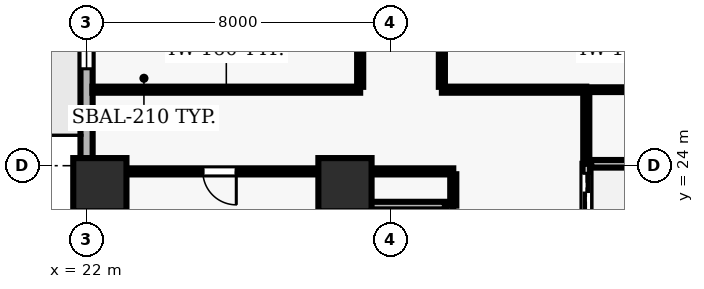
"""IFC4 building model, lengths in metres.
Left out: names, types, materials, properties, quantities, classifications, styles, units other than length and angle.
Written with IfcOpenShell. Run it as: python <this file> out.ifc"""

import sys

from ifc_helpers import new_model, si_unit, direction, frame, frame_2d, origin, origin_2d, place, context, subcontext, project, spatial, rectangle, extrude, element, fill, save


model = new_model("IFC4")
c1 = context("Model", 3, precision=1e-05, world=origin(), true_north=direction((0.0, 1.0)))
c2 = subcontext(c1, "Body", "Model", "MODEL_VIEW")
j1 = project(units=[si_unit("LENGTHUNIT", "METRE"), si_unit("PLANEANGLEUNIT", "RADIAN")], contexts=[c1])
p1 = place(None, origin())
s1 = spatial("IfcSite", under=j1, at=p1, CompositionType="ELEMENT")
p2 = place(p1, origin())
s2 = spatial("IfcBuilding", under=s1, at=p2, CompositionType="ELEMENT")
p3 = place(p2, frame((0.0, 0.0, 77.8)))
s3 = spatial("IfcBuildingStorey", under=s2, at=p3, CompositionType="ELEMENT", Elevation=77.8)
for number, where, z_axis, x_axis in (
    (1, (22.35, 23.5, 0.0), (0.0, 0.0, 1.0), (1.0, 0.0, 0.0)),
    (2, (28.8, 23.5, 0.0), (0.0, 0.0, 1.0), (1.0, 0.0, 0.0)),
):
    element("IfcColumn", number, at=place(p3, frame(where, z_axis=z_axis, x_axis=x_axis)), inside=s3, PredefinedType="COLUMN", context=c2, shape_type="SweptSolid", body=[
        extrude(rectangle(XDim=1.4, YDim=1.4, at=origin_2d()), origin(), (0.0, 0.0, 1.0), 3.9),
    ])
p4 = place(p3, frame((22.0, 51.5, 0.0), z_axis=(0.0, 0.0, 1.0), x_axis=(0.0, -1.0, 0.0)))
e3 = element("IfcWall", 3, at=p4, inside=s3, PredefinedType="SOLIDWALL", context=c2, shape_type="SweptSolid", body=[
    extrude(rectangle(XDim=49.0, YDim=0.32, at=frame_2d((24.5, 0.0))), origin(), (0.0, 0.0, 1.0), 3.69),
])
p5 = place(p4, frame((12.1, 0.0, 0.0)))
e4 = element("IfcOpeningElement", 4, at=p5, cuts=e3, PredefinedType="OPENING", context=c2, shape_type="SweptSolid", body=[
    extrude(rectangle(XDim=1.0, YDim=2.2, at=frame_2d((0.5, 1.1))), frame((0.0, 0.17, 0.0), z_axis=(0.0, -1.0, 0.0), x_axis=(1.0, 0.0, 0.0)), (0.0, 0.0, 1.0), 0.34),
])
p6 = place(p4, frame((1.822, 0.0, 0.9)))
e5 = element("IfcOpeningElement", 5, at=p6, cuts=e3, PredefinedType="OPENING", context=c2, shape_type="SweptSolid", body=[
    extrude(rectangle(XDim=1.8, YDim=1.8, at=frame_2d((0.9, 0.9))), frame((0.0, 0.17, 0.0), z_axis=(0.0, -1.0, 0.0), x_axis=(1.0, 0.0, 0.0)), (0.0, 0.0, 1.0), 0.34),
])
p7 = place(p4, frame((7.267, 0.0, 0.9)))
e6 = element("IfcOpeningElement", 6, at=p7, cuts=e3, PredefinedType="OPENING", context=c2, shape_type="SweptSolid", body=[
    extrude(rectangle(XDim=1.8, YDim=1.8, at=frame_2d((0.9, 0.9))), frame((0.0, 0.17, 0.0), z_axis=(0.0, -1.0, 0.0), x_axis=(1.0, 0.0, 0.0)), (0.0, 0.0, 1.0), 0.34),
])
p8 = place(p4, frame((19.056, 0.0, 0.9)))
e7 = element("IfcOpeningElement", 7, at=p8, cuts=e3, PredefinedType="OPENING", context=c2, shape_type="SweptSolid", body=[
    extrude(rectangle(XDim=1.8, YDim=1.8, at=frame_2d((0.9, 0.9))), frame((0.0, 0.17, 0.0), z_axis=(0.0, -1.0, 0.0), x_axis=(1.0, 0.0, 0.0)), (0.0, 0.0, 1.0), 0.34),
])
p9 = place(p4, frame((23.15, 0.0, 0.9)))
e8 = element("IfcOpeningElement", 8, at=p9, cuts=e3, PredefinedType="OPENING", context=c2, shape_type="SweptSolid", body=[
    extrude(rectangle(XDim=1.8, YDim=1.8, at=frame_2d((0.9, 0.9))), frame((0.0, 0.17, 0.0), z_axis=(0.0, -1.0, 0.0), x_axis=(1.0, 0.0, 0.0)), (0.0, 0.0, 1.0), 0.34),
])
p10 = place(p4, frame((29.044, 0.0, 0.9)))
e9 = element("IfcOpeningElement", 9, at=p10, cuts=e3, PredefinedType="OPENING", context=c2, shape_type="SweptSolid", body=[
    extrude(rectangle(XDim=1.8, YDim=1.8, at=frame_2d((0.9, 0.9))), frame((0.0, 0.17, 0.0), z_axis=(0.0, -1.0, 0.0), x_axis=(1.0, 0.0, 0.0)), (0.0, 0.0, 1.0), 0.34),
])
p11 = place(p4, frame((34.039, 0.0, 0.9)))
e10 = element("IfcOpeningElement", 10, at=p11, cuts=e3, PredefinedType="OPENING", context=c2, shape_type="SweptSolid", body=[
    extrude(rectangle(XDim=1.8, YDim=1.8, at=frame_2d((0.9, 0.9))), frame((0.0, 0.17, 0.0), z_axis=(0.0, -1.0, 0.0), x_axis=(1.0, 0.0, 0.0)), (0.0, 0.0, 1.0), 0.34),
])
p12 = place(p4, frame((39.933, 0.0, 0.9)))
e11 = element("IfcOpeningElement", 11, at=p12, cuts=e3, PredefinedType="OPENING", context=c2, shape_type="SweptSolid", body=[
    extrude(rectangle(XDim=1.8, YDim=1.8, at=frame_2d((0.9, 0.9))), frame((0.0, 0.17, 0.0), z_axis=(0.0, -1.0, 0.0), x_axis=(1.0, 0.0, 0.0)), (0.0, 0.0, 1.0), 0.34),
])
p13 = place(p3, frame((35.15, 24.05, 0.0), z_axis=(0.0, 0.0, 1.0), x_axis=(0.0, -1.0, 0.0)))
e12 = element("IfcWall", 12, at=p13, inside=s3, PredefinedType="SOLIDWALL", context=c2, shape_type="SweptSolid", body=[
    extrude(rectangle(XDim=1.5, YDim=0.2, at=frame_2d((0.75, 0.0))), origin(), (0.0, 0.0, 1.0), 3.69),
])
p14 = place(p13, frame((0.25, 0.0, 0.0)))
e13 = element("IfcOpeningElement", 13, at=p14, cuts=e12, PredefinedType="OPENING", context=c2, shape_type="SweptSolid", body=[
    extrude(rectangle(XDim=1.0, YDim=2.1, at=frame_2d((0.5, 1.05))), frame((0.0, 0.11, 0.0), z_axis=(0.0, -1.0, 0.0), x_axis=(1.0, 0.0, 0.0)), (0.0, 0.0, 1.0), 0.22),
])
p15 = place(p3, frame((37.42, 24.05, 0.0), z_axis=(0.0, 0.0, 1.0), x_axis=(-1.0, 0.0, 0.0)))
e14 = element("IfcWall", 14, at=p15, inside=s3, PredefinedType="SOLIDWALL", context=c2, shape_type="SweptSolid", body=[
    extrude(rectangle(XDim=2.14, YDim=0.2, at=frame_2d((1.07, 0.0))), origin(), (0.0, 0.0, 1.0), 3.69),
])
p16 = place(p3, frame((28.85, 22.95, 0.0), z_axis=(0.0, 0.0, 1.0), x_axis=(0.0, -1.0, 0.0)))
e15 = element("IfcWall", 15, at=p16, inside=s3, PredefinedType="SOLIDWALL", context=c2, shape_type="SweptSolid", body=[
    extrude(rectangle(XDim=1.9, YDim=0.2, at=frame_2d((0.95, 0.0))), origin(), (0.0, 0.0, 1.0), 3.69),
])
p17 = place(p3, frame((31.55, 21.05, 0.0), z_axis=(0.0, 0.0, 1.0), x_axis=(0.0, 1.0, 0.0)))
e16 = element("IfcWall", 16, at=p17, inside=s3, PredefinedType="SOLIDWALL", context=c2, shape_type="SweptSolid", body=[
    extrude(rectangle(XDim=1.9, YDim=0.2, at=frame_2d((0.95, 0.0))), origin(), (0.0, 0.0, 1.0), 3.69),
])
p18 = place(p17, frame((0.45, 0.0, 0.0)))
e17 = element("IfcOpeningElement", 17, at=p18, cuts=e16, PredefinedType="OPENING", context=c2, shape_type="SweptSolid", body=[
    extrude(rectangle(XDim=1.0, YDim=2.1, at=frame_2d((0.5, 1.05))), frame((0.0, 0.11, 0.0), z_axis=(0.0, -1.0, 0.0), x_axis=(1.0, 0.0, 0.0)), (0.0, 0.0, 1.0), 0.22),
])
p19 = place(p3, frame((31.43, 22.95, 0.0), z_axis=(0.0, 0.0, 1.0), x_axis=(-1.0, 0.0, 0.0)))
e18 = element("IfcWall", 18, at=p19, inside=s3, PredefinedType="SOLIDWALL", context=c2, shape_type="SweptSolid", body=[
    extrude(rectangle(XDim=2.46, YDim=0.2, at=frame_2d((1.23, 0.0))), origin(), (0.0, 0.0, 1.0), 3.69),
])
p20 = place(p3, frame((28.8, 23.85, 0.0), z_axis=(0.0, 0.0, 1.0), x_axis=(-1.0, 0.0, 0.0)))
e19 = element("IfcWall", 19, at=p20, inside=s3, PredefinedType="PARTITIONING", context=c2, shape_type="SweptSolid", body=[
    extrude(rectangle(XDim=6.6, YDim=0.16, at=frame_2d((3.3, 0.0))), origin(), (0.0, 0.0, 1.0), 2.995),
])
p21 = place(p20, frame((2.86, 0.0, 0.0)))
e20 = element("IfcOpeningElement", 20, at=p21, cuts=e19, PredefinedType="OPENING", context=c2, shape_type="SweptSolid", body=[
    extrude(rectangle(XDim=0.88, YDim=2.1, at=frame_2d((0.44, 1.05))), frame((0.0, 0.09, 0.0), z_axis=(0.0, -1.0, 0.0), x_axis=(1.0, 0.0, 0.0)), (0.0, 0.0, 1.0), 0.18),
])
p22 = place(p3, frame((28.8, 23.85, 0.0), z_axis=(0.0, 0.0, 1.0), x_axis=(1.0, 0.0, 0.0)))
e21 = element("IfcWall", 21, at=p22, inside=s3, PredefinedType="PARTITIONING", context=c2, shape_type="SweptSolid", body=[
    extrude(rectangle(XDim=2.85, YDim=0.16, at=frame_2d((1.425, 0.0))), origin(), (0.0, 0.0, 1.0), 3.69),
])
p23 = place(p3, frame((29.2, 26.0, 0.0), z_axis=(0.0, 0.0, 1.0), x_axis=(-1.0, 0.0, 0.0)))
e22 = element("IfcWall", 22, at=p23, inside=s3, PredefinedType="PARTITIONING", context=c2, shape_type="SweptSolid", body=[
    extrude(rectangle(XDim=7.045, YDim=0.16, at=frame_2d((3.522, 0.0))), origin(), (0.0, 0.0, 1.0), 3.69),
])
p24 = place(p3, frame((35.15, 26.0, 0.0), z_axis=(0.0, 0.0, 1.0), x_axis=(-1.0, 0.0, 0.0)))
e23 = element("IfcWall", 23, at=p24, inside=s3, PredefinedType="PARTITIONING", context=c2, shape_type="SweptSolid", body=[
    extrude(rectangle(XDim=3.8, YDim=0.16, at=frame_2d((1.9, 0.0))), origin(), (0.0, 0.0, 1.0), 3.69),
])
p25 = place(p3, frame((35.15, 26.0, 0.0), z_axis=(0.0, 0.0, 1.0), x_axis=(1.0, 0.0, 0.0)))
e24 = element("IfcWall", 24, at=p25, inside=s3, PredefinedType="PARTITIONING", context=c2, shape_type="SweptSolid", body=[
    extrude(rectangle(XDim=2.695, YDim=0.125, at=frame_2d((1.348, 0.0))), origin(), (0.0, 0.0, 1.0), 3.69),
])
p26 = place(p3, frame((28.8, 22.95, 0.0), z_axis=(0.0, 0.0, 1.0), x_axis=(0.0, 1.0, 0.0)))
e25 = element("IfcWall", 25, at=p26, inside=s3, PredefinedType="PARTITIONING", context=c2, shape_type="SweptSolid", body=[
    extrude(rectangle(XDim=0.825, YDim=0.135, at=frame_2d((0.413, 0.0))), origin(), (0.0, 0.0, 1.0), 3.69),
])
p27 = place(p3, frame((29.2, 33.195, 0.0), z_axis=(0.0, 0.0, 1.0), x_axis=(0.0, -1.0, 0.0)))
e26 = element("IfcWall", 26, at=p27, inside=s3, PredefinedType="PARTITIONING", context=c2, shape_type="SweptSolid", body=[
    extrude(rectangle(XDim=7.12, YDim=0.16, at=frame_2d((3.56, 0.0))), origin(), (0.0, 0.0, 1.0), 3.69),
])
p28 = place(p27, frame((3.11, 0.0, 0.0)))
e27 = element("IfcOpeningElement", 27, at=p28, cuts=e26, PredefinedType="OPENING", context=c2, shape_type="SweptSolid", body=[
    extrude(rectangle(XDim=0.9, YDim=2.1, at=frame_2d((0.45, 1.05))), frame((0.0, 0.09, 0.0), z_axis=(0.0, -1.0, 0.0), x_axis=(1.0, 0.0, 0.0)), (0.0, 0.0, 1.0), 0.18),
])
p29 = place(p3, frame((31.35, 26.075, 0.0), z_axis=(0.0, 0.0, 1.0), x_axis=(0.0, 1.0, 0.0)))
e28 = element("IfcWall", 28, at=p29, inside=s3, PredefinedType="PARTITIONING", context=c2, shape_type="SweptSolid", body=[
    extrude(rectangle(XDim=7.137, YDim=0.16, at=frame_2d((3.568, 0.0))), origin(), (0.0, 0.0, 1.0), 3.69),
])
p30 = place(p29, frame((3.119, 0.0, 0.0)))
e29 = element("IfcOpeningElement", 29, at=p30, cuts=e28, PredefinedType="OPENING", context=c2, shape_type="SweptSolid", body=[
    extrude(rectangle(XDim=0.9, YDim=2.1, at=frame_2d((0.45, 1.05))), frame((0.0, 0.09, 0.0), z_axis=(0.0, -1.0, 0.0), x_axis=(1.0, 0.0, 0.0)), (0.0, 0.0, 1.0), 0.18),
])
p31 = place(p3, frame((31.65, 23.775, 0.0), z_axis=(0.0, 0.0, 1.0), x_axis=(0.0, -1.0, 0.0)))
e30 = element("IfcWall", 30, at=p31, inside=s3, PredefinedType="PARTITIONING", context=c2, shape_type="SweptSolid", body=[
    extrude(rectangle(XDim=0.825, YDim=0.16, at=frame_2d((0.413, 0.0))), origin(), (0.0, 0.0, 1.0), 3.69),
])
p32 = place(p3, frame((35.15, 24.07, 0.0), z_axis=(0.0, 0.0, 1.0), x_axis=(0.0, 1.0, 0.0)))
e31 = element("IfcWall", 31, at=p32, inside=s3, PredefinedType="PARTITIONING", context=c2, shape_type="SweptSolid", body=[
    extrude(rectangle(XDim=1.855, YDim=0.16, at=frame_2d((0.927, 0.0))), origin(), (0.0, 0.0, 1.0), 3.69),
])
p33 = place(p9, origin())
e32 = element("IfcWindow", 32, at=p33, inside=s3, PartitioningType="SINGLE_PANEL", PredefinedType="WINDOW", context=c2, shape_type="SweptSolid", body=[
    extrude(rectangle(XDim=1.8, YDim=1.8, at=frame_2d((0.9, 0.9))), frame((0.0, 0.03, 0.0), z_axis=(0.0, -1.0, 0.0), x_axis=(1.0, 0.0, 0.0)), (0.0, 0.0, 1.0), 0.06),
])
fill(e8, e32)
p34 = place(p14, origin())
e33 = element("IfcDoor", 33, at=p34, inside=s3, OperationType="DOUBLE_DOOR_SLIDING", PredefinedType="DOOR", context=c2, shape_type="SweptSolid", body=[
    extrude(rectangle(XDim=1.0, YDim=2.1, at=frame_2d((0.5, 1.05))), frame((0.0, 0.025, 0.0), z_axis=(0.0, -1.0, 0.0), x_axis=(1.0, 0.0, 0.0)), (0.0, 0.0, 1.0), 0.05),
])
fill(e13, e33)
p35 = place(p21, origin())
e34 = element("IfcDoor", 34, at=p35, inside=s3, OperationType="SINGLE_SWING_LEFT", PredefinedType="DOOR", context=c2, shape_type="SweptSolid", body=[
    extrude(rectangle(XDim=0.88, YDim=2.1, at=frame_2d((0.44, 1.05))), frame((0.0, 0.025, 0.0), z_axis=(0.0, -1.0, 0.0), x_axis=(1.0, 0.0, 0.0)), (0.0, 0.0, 1.0), 0.05),
])
fill(e20, e34)
save(model, sys.argv[1])
